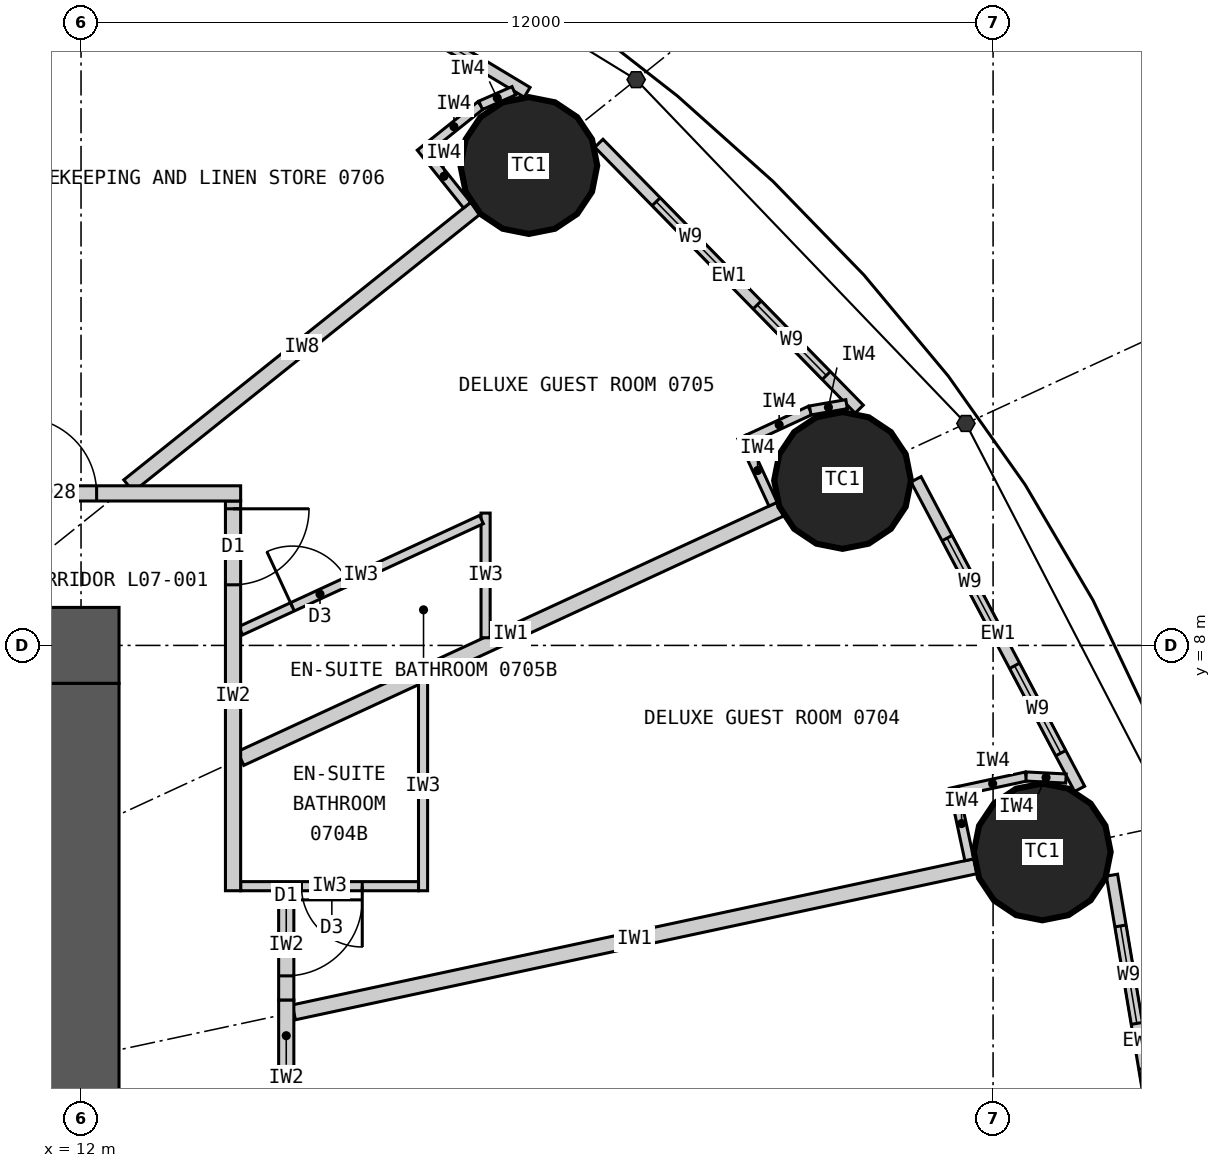
"""IFC4 building model, lengths in metres.
Left out: names, types, materials, properties, quantities, classifications, styles, units other than length and angle.
Written with IfcOpenShell. Run it as: python <this file> out.ifc"""

import sys

from ifc_helpers import new_model, si_unit, direction, frame, frame_2d, origin, origin_2d, place, context, subcontext, project, spatial, rectangle, circle, extrude, element, fill, save


model = new_model("IFC4")
c1 = context("Model", 3, precision=1e-05, world=origin(), true_north=direction((0.0, 1.0)))
c2 = subcontext(c1, "Body", "Model", "MODEL_VIEW")
j1 = project(units=[si_unit("LENGTHUNIT", "METRE"), si_unit("PLANEANGLEUNIT", "RADIAN")], contexts=[c1])
p1 = place(None, origin())
s1 = spatial("IfcSite", under=j1, at=p1, CompositionType="ELEMENT")
p2 = place(p1, origin())
s2 = spatial("IfcBuilding", under=s1, at=p2, CompositionType="ELEMENT")
p3 = place(p2, frame((0.0, 0.0, 36.0)))
s3 = spatial("IfcBuildingStorey", under=s2, at=p3, CompositionType="ELEMENT", Elevation=36.0)
for number, where, z_axis, x_axis in (
    (1, (24.647, 5.283, 0.0), (0.0, 0.0, 1.0), (1.0, 0.0, 0.0)),
    (2, (22.019, 10.17, 0.0), (0.0, 0.0, 1.0), (1.0, 0.0, 0.0)),
    (3, (17.892, 14.313, 0.0), (0.0, 0.0, 1.0), (1.0, 0.0, 0.0)),
):
    element("IfcColumn", number, at=place(p3, frame(where, z_axis=z_axis, x_axis=x_axis)), inside=s3, PredefinedType="COLUMN", context=c2, shape_type="SweptSolid", body=[
        extrude(circle(Radius=0.9, at=origin_2d()), origin(), (0.0, 0.0, 1.0), 3.3),
    ])
p4 = place(p3, frame((-12.5, 8.0, 0.0), z_axis=(0.0, 0.0, 1.0), x_axis=(1.0, 0.0, 0.0)))
e4 = element("IfcWall", 4, at=p4, inside=s3, PredefinedType="SHEAR", context=c2, shape_type="SweptSolid", body=[
    extrude(rectangle(XDim=25.0, YDim=1.0, at=frame_2d((12.5, 0.0))), origin(), (0.0, 0.0, 1.0), 3.3),
])
p5 = place(p4, frame((11.2, 0.0, 0.0)))
e5 = element("IfcOpeningElement", 5, at=p5, cuts=e4, PredefinedType="OPENING", context=c2, shape_type="SweptSolid", body=[
    extrude(rectangle(XDim=1.2, YDim=2.2, at=frame_2d((0.6, 1.1))), frame((0.0, 0.51, 0.0), z_axis=(0.0, -1.0, 0.0), x_axis=(1.0, 0.0, 0.0)), (0.0, 0.0, 1.0), 1.02),
])
p6 = place(p4, frame((18.8, 0.0, 0.0)))
e6 = element("IfcOpeningElement", 6, at=p6, cuts=e4, PredefinedType="OPENING", context=c2, shape_type="SweptSolid", body=[
    extrude(rectangle(XDim=0.9, YDim=2.2, at=frame_2d((0.45, 1.1))), frame((0.0, 0.51, 0.0), z_axis=(0.0, -1.0, 0.0), x_axis=(1.0, 0.0, 0.0)), (0.0, 0.0, 1.0), 1.02),
])
p7 = place(p3, frame((12.0, -7.5, 0.0), z_axis=(0.0, 0.0, 1.0), x_axis=(0.0, 1.0, 0.0)))
e7 = element("IfcWall", 7, at=p7, inside=s3, PredefinedType="SHEAR", context=c2, shape_type="SweptSolid", body=[
    extrude(rectangle(XDim=15.0, YDim=1.0, at=frame_2d((7.5, 0.0))), origin(), (0.0, 0.0, 1.0), 3.3),
])
p8 = place(p7, frame((6.6, 0.0, 0.0)))
e8 = element("IfcOpeningElement", 8, at=p8, cuts=e7, PredefinedType="OPENING", context=c2, shape_type="SweptSolid", body=[
    extrude(rectangle(XDim=1.8, YDim=2.2, at=frame_2d((0.9, 1.1))), frame((0.0, 0.51, 0.0), z_axis=(0.0, -1.0, 0.0), x_axis=(1.0, 0.0, 0.0)), (0.0, 0.0, 1.0), 1.02),
])
p9 = place(p3, frame((26.297, 0.611, 0.0), z_axis=(0.0, 0.0, 1.0), x_axis=(-0.165641751141, 0.986185991727, 0.0)))
e9 = element("IfcWall", 9, at=p9, inside=s3, PredefinedType="ELEMENTEDWALL", context=c2, shape_type="SweptSolid", body=[
    extrude(rectangle(XDim=4.428, YDim=0.15, at=frame_2d((2.214, 0.0))), origin(), (0.0, 0.0, 1.0), 3.12),
])
p10 = place(p9, frame((0.55, 0.0, 0.9)))
e10 = element("IfcOpeningElement", 10, at=p10, cuts=e9, PredefinedType="OPENING", context=c2, shape_type="SweptSolid", body=[
    extrude(rectangle(XDim=1.3, YDim=1.9, at=frame_2d((0.65, 0.95))), frame((0.0, 0.085, 0.0), z_axis=(0.0, -1.0, 0.0), x_axis=(1.0, 0.0, 0.0)), (0.0, 0.0, 1.0), 0.17),
])
p11 = place(p9, frame((2.45, 0.0, 0.9)))
e11 = element("IfcOpeningElement", 11, at=p11, cuts=e9, PredefinedType="OPENING", context=c2, shape_type="SweptSolid", body=[
    extrude(rectangle(XDim=1.3, YDim=1.9, at=frame_2d((0.65, 0.95))), frame((0.0, 0.085, 0.0), z_axis=(0.0, -1.0, 0.0), x_axis=(1.0, 0.0, 0.0)), (0.0, 0.0, 1.0), 0.17),
])
p12 = place(p3, frame((25.139, 6.113, 0.0), z_axis=(0.0, 0.0, 1.0), x_axis=(-0.467303182954, 0.884097129959, 0.0)))
e12 = element("IfcWall", 12, at=p12, inside=s3, PredefinedType="ELEMENTEDWALL", context=c2, shape_type="SweptSolid", body=[
    extrude(rectangle(XDim=4.606, YDim=0.15, at=frame_2d((2.303, 0.0))), origin(), (0.0, 0.0, 1.0), 3.12),
])
p13 = place(p12, frame((0.531, 0.0, 0.9)))
e13 = element("IfcOpeningElement", 13, at=p13, cuts=e12, PredefinedType="OPENING", context=c2, shape_type="SweptSolid", body=[
    extrude(rectangle(XDim=1.3, YDim=1.9, at=frame_2d((0.65, 0.95))), frame((0.0, 0.085, 0.0), z_axis=(0.0, -1.0, 0.0), x_axis=(1.0, 0.0, 0.0)), (0.0, 0.0, 1.0), 0.17),
])
p14 = place(p12, frame((2.432, 0.0, 0.9)))
e14 = element("IfcOpeningElement", 14, at=p14, cuts=e12, PredefinedType="OPENING", context=c2, shape_type="SweptSolid", body=[
    extrude(rectangle(XDim=1.3, YDim=1.9, at=frame_2d((0.65, 0.95))), frame((0.0, 0.085, 0.0), z_axis=(0.0, -1.0, 0.0), x_axis=(1.0, 0.0, 0.0)), (0.0, 0.0, 1.0), 0.17),
])
p15 = place(p3, frame((22.239, 11.108, 0.0), z_axis=(0.0, 0.0, 1.0), x_axis=(-0.699612594083, 0.714522370679, 0.0)))
e15 = element("IfcWall", 15, at=p15, inside=s3, PredefinedType="ELEMENTEDWALL", context=c2, shape_type="SweptSolid", body=[
    extrude(rectangle(XDim=4.896, YDim=0.15, at=frame_2d((2.448, 0.0))), origin(), (0.0, 0.0, 1.0), 3.12),
])
p16 = place(p15, frame((0.619, 0.0, 0.9)))
e16 = element("IfcOpeningElement", 16, at=p16, cuts=e15, PredefinedType="OPENING", context=c2, shape_type="SweptSolid", body=[
    extrude(rectangle(XDim=1.3, YDim=1.9, at=frame_2d((0.65, 0.95))), frame((0.0, 0.085, 0.0), z_axis=(0.0, -1.0, 0.0), x_axis=(1.0, 0.0, 0.0)), (0.0, 0.0, 1.0), 0.17),
])
p17 = place(p15, frame((2.519, 0.0, 0.9)))
e17 = element("IfcOpeningElement", 17, at=p17, cuts=e15, PredefinedType="OPENING", context=c2, shape_type="SweptSolid", body=[
    extrude(rectangle(XDim=1.3, YDim=1.9, at=frame_2d((0.65, 0.95))), frame((0.0, 0.085, 0.0), z_axis=(0.0, -1.0, 0.0), x_axis=(1.0, 0.0, 0.0)), (0.0, 0.0, 1.0), 0.17),
])
p18 = place(p3, frame((17.869, 15.277, 0.0), z_axis=(0.0, 0.0, 1.0), x_axis=(-0.856958191554, 0.515385931054, 0.0)))
e18 = element("IfcWall", 18, at=p18, inside=s3, PredefinedType="ELEMENTEDWALL", context=c2, shape_type="SweptSolid", body=[
    extrude(rectangle(XDim=5.201, YDim=0.15, at=frame_2d((2.601, 0.0))), origin(), (0.0, 0.0, 1.0), 3.12),
])
p19 = place(p18, frame((0.776, 0.0, 0.9)))
e19 = element("IfcOpeningElement", 19, at=p19, cuts=e18, PredefinedType="OPENING", context=c2, shape_type="SweptSolid", body=[
    extrude(rectangle(XDim=1.3, YDim=1.9, at=frame_2d((0.65, 0.95))), frame((0.0, 0.085, 0.0), z_axis=(0.0, -1.0, 0.0), x_axis=(1.0, 0.0, 0.0)), (0.0, 0.0, 1.0), 0.17),
])
p20 = place(p18, frame((2.676, 0.0, 0.9)))
e20 = element("IfcOpeningElement", 20, at=p20, cuts=e18, PredefinedType="OPENING", context=c2, shape_type="SweptSolid", body=[
    extrude(rectangle(XDim=1.3, YDim=1.9, at=frame_2d((0.65, 0.95))), frame((0.0, 0.085, 0.0), z_axis=(0.0, -1.0, 0.0), x_axis=(1.0, 0.0, 0.0)), (0.0, 0.0, 1.0), 0.17),
])
p21 = place(p3, frame((14.8, 3.173, 0.0), z_axis=(0.0, 0.0, 1.0), x_axis=(0.977788776497, 0.209592720667, 0.0)))
e21 = element("IfcWall", 21, at=p21, inside=s3, PredefinedType="PARTITIONING", context=c2, shape_type="SweptSolid", body=[
    extrude(rectangle(XDim=9.171, YDim=0.2, at=frame_2d((4.585, 0.0))), origin(), (0.0, 0.0, 1.0), 2.32),
])
p22 = place(p3, frame((14.1, 6.512, 0.0), z_axis=(0.0, 0.0, 1.0), x_axis=(0.907842433118, 0.41931147925, 0.0)))
e22 = element("IfcWall", 22, at=p22, inside=s3, PredefinedType="PARTITIONING", context=c2, shape_type="SweptSolid", body=[
    extrude(rectangle(XDim=7.823, YDim=0.2, at=frame_2d((3.912, 0.0))), origin(), (0.0, 0.0, 1.0), 2.32),
])
p23 = place(p3, frame((12.625, 10.1, 0.0), z_axis=(0.0, 0.0, 1.0), x_axis=(0.780872884676, 0.624689953479, 0.0)))
e23 = element("IfcWall", 23, at=p23, inside=s3, PredefinedType="PARTITIONING", context=c2, shape_type="SweptSolid", body=[
    extrude(rectangle(XDim=5.845, YDim=0.2, at=frame_2d((2.922, 0.0))), origin(), (0.0, 0.0, 1.0), 2.32),
])
p24 = place(p3, frame((7.289, 10.1, 0.0), z_axis=(0.0, 0.0, 1.0), x_axis=(0.585216319319, 0.810877216108, 0.0)))
e24 = element("IfcWall", 24, at=p24, inside=s3, PredefinedType="PARTITIONING", context=c2, shape_type="SweptSolid", body=[
    extrude(rectangle(XDim=8.16, YDim=0.2, at=frame_2d((4.08, 0.0))), origin(), (0.0, 0.0, 1.0), 2.32),
])
p25 = place(p3, frame((16.5, 7.521, 0.0), z_axis=(0.0, 0.0, 1.0), x_axis=(0.0, -1.0, 0.0)))
e25 = element("IfcWall", 25, at=p25, inside=s3, PredefinedType="PARTITIONING", context=c2, shape_type="SweptSolid", body=[
    extrude(rectangle(XDim=2.749, YDim=0.12, at=frame_2d((1.374, 0.0))), origin(), (0.0, 0.0, 1.0), 3.12),
])
p26 = place(p3, frame((14.1, 4.833, 0.0), z_axis=(0.0, 0.0, 1.0), x_axis=(1.0, 0.0, 0.0)))
e26 = element("IfcWall", 26, at=p26, inside=s3, PredefinedType="PARTITIONING", context=c2, shape_type="SweptSolid", body=[
    extrude(rectangle(XDim=2.34, YDim=0.12, at=frame_2d((1.17, 0.0))), origin(), (0.0, 0.0, 1.0), 3.12),
])
p27 = place(p26, frame((0.8, 0.0, 0.0)))
e27 = element("IfcOpeningElement", 27, at=p27, cuts=e26, PredefinedType="OPENING", context=c2, shape_type="SweptSolid", body=[
    extrude(rectangle(XDim=0.8, YDim=2.1, at=frame_2d((0.4, 1.05))), frame((0.0, 0.07, 0.0), z_axis=(0.0, -1.0, 0.0), x_axis=(1.0, 0.0, 0.0)), (0.0, 0.0, 1.0), 0.14),
])
p28 = place(p3, frame((17.323, 8.101, 0.0), z_axis=(0.0, 0.0, 1.0), x_axis=(0.0, 1.0, 0.0)))
e28 = element("IfcWall", 28, at=p28, inside=s3, PredefinedType="PARTITIONING", context=c2, shape_type="SweptSolid", body=[
    extrude(rectangle(XDim=1.64, YDim=0.12, at=frame_2d((0.82, 0.0))), origin(), (0.0, 0.0, 1.0), 3.12),
])
p29 = place(p3, frame((14.1, 8.193, 0.0), z_axis=(0.0, 0.0, 1.0), x_axis=(0.907836493557, 0.419324338628, 0.0)))
e29 = element("IfcWall", 29, at=p29, inside=s3, PredefinedType="PARTITIONING", context=c2, shape_type="SweptSolid", body=[
    extrude(rectangle(XDim=3.49, YDim=0.12, at=frame_2d((1.745, 0.0))), origin(), (0.0, 0.0, 1.0), 3.12),
])
p30 = place(p29, frame((0.75, 0.0, 0.0)))
e30 = element("IfcOpeningElement", 30, at=p30, cuts=e29, PredefinedType="OPENING", context=c2, shape_type="SweptSolid", body=[
    extrude(rectangle(XDim=0.8, YDim=2.1, at=frame_2d((0.4, 1.05))), frame((0.0, 0.07, 0.0), z_axis=(0.0, -1.0, 0.0), x_axis=(1.0, 0.0, 0.0)), (0.0, 0.0, 1.0), 0.14),
])
p31 = place(p3, frame((14.7, 0.958, 0.0), z_axis=(0.0, 0.0, 1.0), x_axis=(0.0, 1.0, 0.0)))
e31 = element("IfcWall", 31, at=p31, inside=s3, PredefinedType="PARTITIONING", context=c2, shape_type="SweptSolid", body=[
    extrude(rectangle(XDim=1.44, YDim=0.2, at=frame_2d((0.72, 0.0))), origin(), (0.0, 0.0, 1.0), 3.12),
])
p32 = place(p31, frame((0.12, 0.0, 0.0)))
e32 = element("IfcOpeningElement", 32, at=p32, cuts=e31, PredefinedType="OPENING", context=c2, shape_type="SweptSolid", body=[
    extrude(rectangle(XDim=1.0, YDim=2.2, at=frame_2d((0.5, 1.1))), frame((0.0, 0.11, 0.0), z_axis=(0.0, -1.0, 0.0), x_axis=(1.0, 0.0, 0.0)), (0.0, 0.0, 1.0), 0.22),
])
p33 = place(p3, frame((14.7, 3.333, 0.0), z_axis=(0.0, 0.0, 1.0), x_axis=(0.0, 1.0, 0.0)))
e33 = element("IfcWall", 33, at=p33, inside=s3, PredefinedType="PARTITIONING", context=c2, shape_type="SweptSolid", body=[
    extrude(rectangle(XDim=1.44, YDim=0.2, at=frame_2d((0.72, 0.0))), origin(), (0.0, 0.0, 1.0), 3.12),
])
p34 = place(p33, frame((0.32, 0.0, 0.0)))
e34 = element("IfcOpeningElement", 34, at=p34, cuts=e33, PredefinedType="OPENING", context=c2, shape_type="SweptSolid", body=[
    extrude(rectangle(XDim=1.0, YDim=2.2, at=frame_2d((0.5, 1.1))), frame((0.0, 0.11, 0.0), z_axis=(0.0, -1.0, 0.0), x_axis=(1.0, 0.0, 0.0)), (0.0, 0.0, 1.0), 0.22),
])
p35 = place(p3, frame((14.7, 2.398, 0.0), z_axis=(0.0, 0.0, 1.0), x_axis=(0.0, 1.0, 0.0)))
e35 = element("IfcWall", 35, at=p35, inside=s3, PredefinedType="PARTITIONING", context=c2, shape_type="SweptSolid", body=[
    extrude(rectangle(XDim=0.935, YDim=0.2, at=frame_2d((0.467, 0.0))), origin(), (0.0, 0.0, 1.0), 3.12),
])
p36 = place(p3, frame((14.0, 4.772, 0.0), z_axis=(0.0, 0.0, 1.0), x_axis=(0.0, 1.0, 0.0)))
e36 = element("IfcWall", 36, at=p36, inside=s3, PredefinedType="PARTITIONING", context=c2, shape_type="SweptSolid", body=[
    extrude(rectangle(XDim=5.127, YDim=0.2, at=frame_2d((2.564, 0.0))), origin(), (0.0, 0.0, 1.0), 3.12),
])
p37 = place(p36, frame((4.025, 0.0, 0.0)))
e37 = element("IfcOpeningElement", 37, at=p37, cuts=e36, PredefinedType="OPENING", context=c2, shape_type="SweptSolid", body=[
    extrude(rectangle(XDim=1.0, YDim=2.2, at=frame_2d((0.5, 1.1))), frame((0.0, 0.11, 0.0), z_axis=(0.0, -1.0, 0.0), x_axis=(1.0, 0.0, 0.0)), (0.0, 0.0, 1.0), 0.22),
])
p38 = place(p3, frame((5.549, 10.0, 0.0), z_axis=(0.0, 0.0, 1.0), x_axis=(1.0, 0.0, 0.0)))
e38 = element("IfcWall", 38, at=p38, inside=s3, PredefinedType="PARTITIONING", context=c2, shape_type="SweptSolid", body=[
    extrude(rectangle(XDim=8.551, YDim=0.2, at=frame_2d((4.275, 0.0))), origin(), (0.0, 0.0, 1.0), 3.12),
])
p39 = place(p38, frame((5.656, 0.0, 0.0)))
e39 = element("IfcOpeningElement", 39, at=p39, cuts=e38, PredefinedType="OPENING", context=c2, shape_type="SweptSolid", body=[
    extrude(rectangle(XDim=1.0, YDim=2.2, at=frame_2d((0.5, 1.1))), frame((0.0, 0.11, 0.0), z_axis=(0.0, -1.0, 0.0), x_axis=(1.0, 0.0, 0.0)), (0.0, 0.0, 1.0), 0.22),
])
p40 = place(p3, frame((23.687, 5.18, 0.0), z_axis=(0.0, 0.0, 1.0), x_axis=(-0.209443540911, 0.977820741839, 0.0)))
e40 = element("IfcWall", 40, at=p40, inside=s3, PredefinedType="PARTITIONING", context=c2, shape_type="SweptSolid", body=[
    extrude(rectangle(XDim=0.975, YDim=0.12, at=frame_2d((0.487, 0.0))), origin(), (0.0, 0.0, 1.0), 3.12),
])
p41 = place(p3, frame((23.554, 6.087, 0.0), z_axis=(0.0, 0.0, 1.0), x_axis=(0.977762694187, 0.209714362543, 0.0)))
e41 = element("IfcWall", 41, at=p41, inside=s3, PredefinedType="PARTITIONING", context=c2, shape_type="SweptSolid", body=[
    extrude(rectangle(XDim=0.9, YDim=0.12, at=frame_2d((0.45, 0.0))), origin(), (0.0, 0.0, 1.0), 3.12),
])
p42 = place(p3, frame((24.434, 6.275, 0.0), z_axis=(0.0, 0.0, 1.0), x_axis=(0.998714959873, -0.050679669751, 0.0)))
e42 = element("IfcWall", 42, at=p42, inside=s3, PredefinedType="PARTITIONING", context=c2, shape_type="SweptSolid", body=[
    extrude(rectangle(XDim=0.525, YDim=0.12, at=frame_2d((0.263, 0.0))), origin(), (0.0, 0.0, 1.0), 3.12),
])
p43 = place(p3, frame((21.106, 9.858, 0.0), z_axis=(0.0, 0.0, 1.0), x_axis=(-0.419344098106, 0.907827366509, 0.0)))
e43 = element("IfcWall", 43, at=p43, inside=s3, PredefinedType="PARTITIONING", context=c2, shape_type="SweptSolid", body=[
    extrude(rectangle(XDim=0.975, YDim=0.12, at=frame_2d((0.487, 0.0))), origin(), (0.0, 0.0, 1.0), 3.12),
])
p44 = place(p3, frame((20.777, 10.714, 0.0), z_axis=(0.0, 0.0, 1.0), x_axis=(0.907832324198, 0.419333365166, 0.0)))
e44 = element("IfcWall", 44, at=p44, inside=s3, PredefinedType="PARTITIONING", context=c2, shape_type="SweptSolid", body=[
    extrude(rectangle(XDim=0.9, YDim=0.12, at=frame_2d((0.45, 0.0))), origin(), (0.0, 0.0, 1.0), 3.12),
])
p45 = place(p3, frame((21.594, 11.091, 0.0), z_axis=(0.0, 0.0, 1.0), x_axis=(0.985483306792, 0.169772353566, 0.0)))
e45 = element("IfcWall", 45, at=p45, inside=s3, PredefinedType="PARTITIONING", context=c2, shape_type="SweptSolid", body=[
    extrude(rectangle(XDim=0.486, YDim=0.12, at=frame_2d((0.243, 0.0))), origin(), (0.0, 0.0, 1.0), 3.12),
])
p46 = place(p3, frame((17.08, 13.792, 0.0), z_axis=(0.0, 0.0, 1.0), x_axis=(-0.624756144097, 0.780819928289, 0.0)))
e46 = element("IfcWall", 46, at=p46, inside=s3, PredefinedType="PARTITIONING", context=c2, shape_type="SweptSolid", body=[
    extrude(rectangle(XDim=0.975, YDim=0.12, at=frame_2d((0.487, 0.0))), origin(), (0.0, 0.0, 1.0), 3.12),
])
p47 = place(p3, frame((16.555, 14.543, 0.0), z_axis=(0.0, 0.0, 1.0), x_axis=(0.780789399477, 0.62479429708, 0.0)))
e47 = element("IfcWall", 47, at=p47, inside=s3, PredefinedType="PARTITIONING", context=c2, shape_type="SweptSolid", body=[
    extrude(rectangle(XDim=0.9, YDim=0.12, at=frame_2d((0.45, 0.0))), origin(), (0.0, 0.0, 1.0), 3.12),
])
p48 = place(p3, frame((17.258, 15.106, 0.0), z_axis=(0.0, 0.0, 1.0), x_axis=(0.916098562583, 0.400953143937, 0.0)))
e48 = element("IfcWall", 48, at=p48, inside=s3, PredefinedType="PARTITIONING", context=c2, shape_type="SweptSolid", body=[
    extrude(rectangle(XDim=0.477, YDim=0.12, at=frame_2d((0.238, 0.0))), origin(), (0.0, 0.0, 1.0), 3.12),
])
p49 = place(p11, origin())
e49 = element("IfcWindow", 49, at=p49, inside=s3, PartitioningType="SINGLE_PANEL", PredefinedType="WINDOW", context=c2, shape_type="SweptSolid", body=[
    extrude(rectangle(XDim=1.3, YDim=1.9, at=frame_2d((0.65, 0.95))), frame((0.0, 0.03, 0.0), z_axis=(0.0, -1.0, 0.0), x_axis=(1.0, 0.0, 0.0)), (0.0, 0.0, 1.0), 0.06),
])
fill(e11, e49)
p50 = place(p13, origin())
e50 = element("IfcWindow", 50, at=p50, inside=s3, PartitioningType="SINGLE_PANEL", PredefinedType="WINDOW", context=c2, shape_type="SweptSolid", body=[
    extrude(rectangle(XDim=1.3, YDim=1.9, at=frame_2d((0.65, 0.95))), frame((0.0, 0.03, 0.0), z_axis=(0.0, -1.0, 0.0), x_axis=(1.0, 0.0, 0.0)), (0.0, 0.0, 1.0), 0.06),
])
fill(e13, e50)
p51 = place(p14, origin())
e51 = element("IfcWindow", 51, at=p51, inside=s3, PartitioningType="SINGLE_PANEL", PredefinedType="WINDOW", context=c2, shape_type="SweptSolid", body=[
    extrude(rectangle(XDim=1.3, YDim=1.9, at=frame_2d((0.65, 0.95))), frame((0.0, 0.03, 0.0), z_axis=(0.0, -1.0, 0.0), x_axis=(1.0, 0.0, 0.0)), (0.0, 0.0, 1.0), 0.06),
])
fill(e14, e51)
p52 = place(p16, origin())
e52 = element("IfcWindow", 52, at=p52, inside=s3, PartitioningType="SINGLE_PANEL", PredefinedType="WINDOW", context=c2, shape_type="SweptSolid", body=[
    extrude(rectangle(XDim=1.3, YDim=1.9, at=frame_2d((0.65, 0.95))), frame((0.0, 0.03, 0.0), z_axis=(0.0, -1.0, 0.0), x_axis=(1.0, 0.0, 0.0)), (0.0, 0.0, 1.0), 0.06),
])
fill(e16, e52)
p53 = place(p17, origin())
e53 = element("IfcWindow", 53, at=p53, inside=s3, PartitioningType="SINGLE_PANEL", PredefinedType="WINDOW", context=c2, shape_type="SweptSolid", body=[
    extrude(rectangle(XDim=1.3, YDim=1.9, at=frame_2d((0.65, 0.95))), frame((0.0, 0.03, 0.0), z_axis=(0.0, -1.0, 0.0), x_axis=(1.0, 0.0, 0.0)), (0.0, 0.0, 1.0), 0.06),
])
fill(e17, e53)
p54 = place(p19, origin())
e54 = element("IfcWindow", 54, at=p54, inside=s3, PartitioningType="SINGLE_PANEL", PredefinedType="WINDOW", context=c2, shape_type="SweptSolid", body=[
    extrude(rectangle(XDim=1.3, YDim=1.9, at=frame_2d((0.65, 0.95))), frame((0.0, 0.03, 0.0), z_axis=(0.0, -1.0, 0.0), x_axis=(1.0, 0.0, 0.0)), (0.0, 0.0, 1.0), 0.06),
])
fill(e19, e54)
p55 = place(p27, origin())
e55 = element("IfcDoor", 55, at=p55, inside=s3, OperationType="SINGLE_SWING_RIGHT", PredefinedType="DOOR", context=c2, shape_type="SweptSolid", body=[
    extrude(rectangle(XDim=0.8, YDim=2.1, at=frame_2d((0.4, 1.05))), frame((0.0, 0.025, 0.0), z_axis=(0.0, -1.0, 0.0), x_axis=(1.0, 0.0, 0.0)), (0.0, 0.0, 1.0), 0.05),
])
fill(e27, e55)
p56 = place(p34, origin())
e56 = element("IfcDoor", 56, at=p56, inside=s3, OperationType="SINGLE_SWING_RIGHT", PredefinedType="DOOR", context=c2, shape_type="SweptSolid", body=[
    extrude(rectangle(XDim=1.0, YDim=2.2, at=frame_2d((0.5, 1.1))), frame((0.0, 0.025, 0.0), z_axis=(0.0, -1.0, 0.0), x_axis=(1.0, 0.0, 0.0)), (0.0, 0.0, 1.0), 0.05),
])
fill(e34, e56)
p57 = place(p30, origin())
e57 = element("IfcDoor", 57, at=p57, inside=s3, OperationType="SINGLE_SWING_LEFT", PredefinedType="DOOR", context=c2, shape_type="SweptSolid", body=[
    extrude(rectangle(XDim=0.8, YDim=2.1, at=frame_2d((0.4, 1.05))), frame((0.0, 0.025, 0.0), z_axis=(0.0, -1.0, 0.0), x_axis=(1.0, 0.0, 0.0)), (0.0, 0.0, 1.0), 0.05),
])
fill(e30, e57)
p58 = place(p37, origin())
e58 = element("IfcDoor", 58, at=p58, inside=s3, OperationType="SINGLE_SWING_RIGHT", PredefinedType="DOOR", context=c2, shape_type="SweptSolid", body=[
    extrude(rectangle(XDim=1.0, YDim=2.2, at=frame_2d((0.5, 1.1))), frame((0.0, 0.025, 0.0), z_axis=(0.0, -1.0, 0.0), x_axis=(1.0, 0.0, 0.0)), (0.0, 0.0, 1.0), 0.05),
])
fill(e37, e58)
p59 = place(p39, origin())
e59 = element("IfcDoor", 59, at=p59, inside=s3, OperationType="SINGLE_SWING_LEFT", PredefinedType="DOOR", context=c2, shape_type="SweptSolid", body=[
    extrude(rectangle(XDim=1.0, YDim=2.2, at=frame_2d((0.5, 1.1))), frame((0.0, 0.025, 0.0), z_axis=(0.0, -1.0, 0.0), x_axis=(1.0, 0.0, 0.0)), (0.0, 0.0, 1.0), 0.05),
])
fill(e39, e59)
save(model, sys.argv[1])
